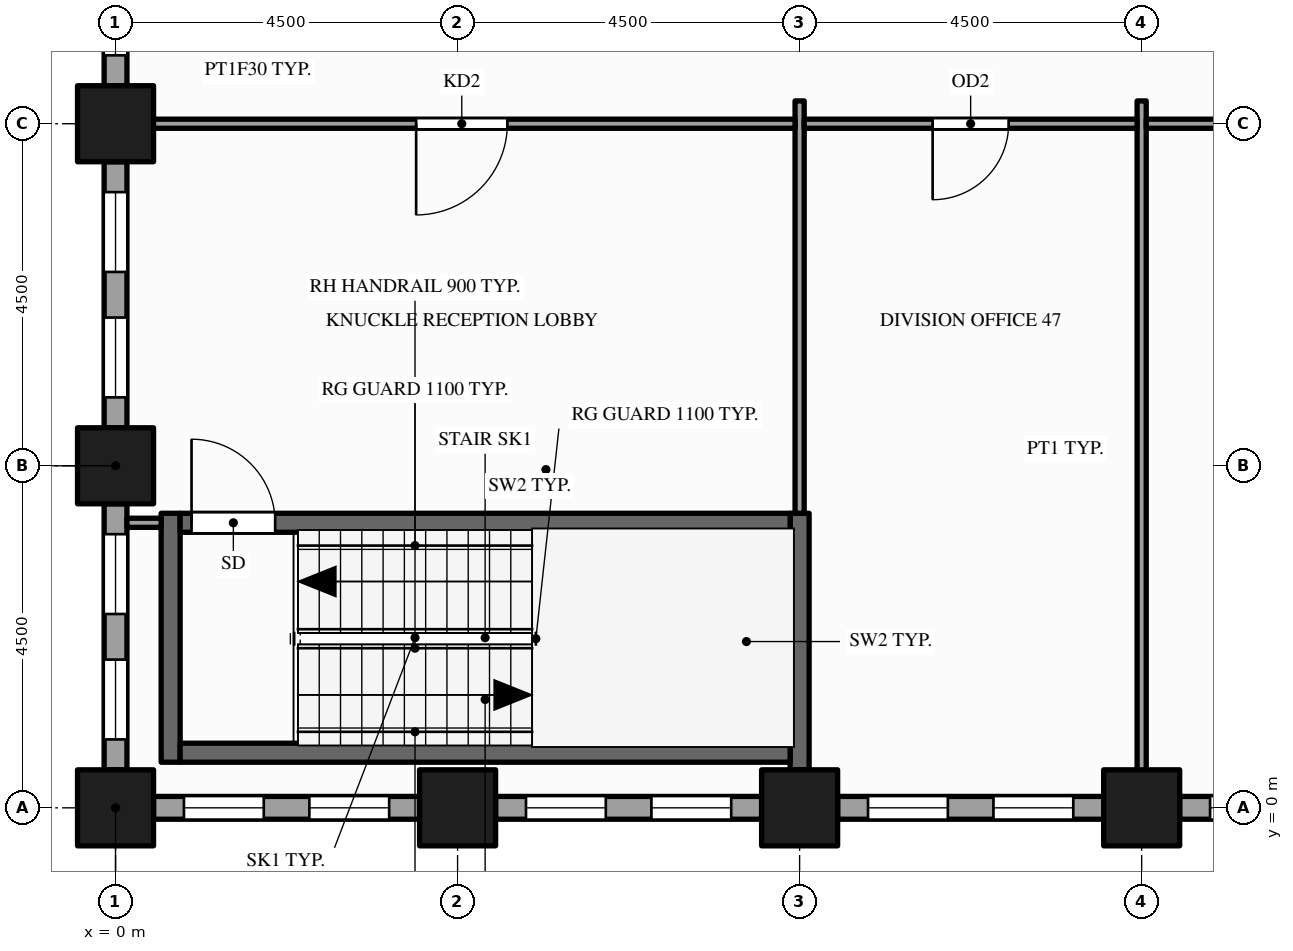
"""IFC4 building model, lengths in metres.
Left out: names, types, materials, properties, quantities, classifications, styles, units other than length and angle.
Written with IfcOpenShell. Run it as: python <this file> out.ifc"""

import sys

from ifc_helpers import new_model, si_unit, direction, frame, frame_2d, origin, origin_2d, place, context, subcontext, project, spatial, rectangle, hollow_rectangle, extrude, element, fill, save


model = new_model("IFC4")
c1 = context("Model", 3, precision=1e-05, world=origin(), true_north=direction((0.0, 1.0)))
c2 = subcontext(c1, "Body", "Model", "MODEL_VIEW")
j1 = project(units=[si_unit("LENGTHUNIT", "METRE"), si_unit("PLANEANGLEUNIT", "RADIAN")], contexts=[c1])
p1 = place(None, origin())
s1 = spatial("IfcSite", under=j1, at=p1, CompositionType="ELEMENT")
p2 = place(p1, origin())
s2 = spatial("IfcBuilding", under=s1, at=p2, CompositionType="ELEMENT")
p3 = place(p2, frame((0.0, 0.0, 115.0)))
s3 = spatial("IfcBuildingStorey", under=s2, at=p3, CompositionType="ELEMENT", Elevation=115.0)
for number, where, z_axis, x_axis in (
    (1, (0.0, 0.0, -0.15), (0.0, 0.0, 1.0), (1.0, 0.0, 0.0)),
    (2, (0.0, 4.5, -0.15), (0.0, 0.0, 1.0), (1.0, 0.0, 0.0)),
    (3, (0.0, 9.0, -0.15), (0.0, 0.0, 1.0), (1.0, 0.0, 0.0)),
    (4, (4.5, 0.0, -0.15), (0.0, 0.0, 1.0), (1.0, 0.0, 0.0)),
    (5, (9.0, 0.0, -0.15), (0.0, 0.0, 1.0), (1.0, 0.0, 0.0)),
    (6, (13.5, 0.0, -0.15), (0.0, 0.0, 1.0), (1.0, 0.0, 0.0)),
):
    element("IfcColumn", number, at=place(p3, frame(where, z_axis=z_axis, x_axis=x_axis)), inside=s3, PredefinedType="COLUMN", context=c2, shape_type="SweptSolid", body=[
        extrude(hollow_rectangle(XDim=1.0, YDim=1.0, WallThickness=0.05, at=origin_2d()), origin(), (0.0, 0.0, 1.0), 4.0),
    ])
p4 = place(p3, frame((0.0, 13.0, 0.0), z_axis=(0.0, 0.0, 1.0), x_axis=(0.0, -1.0, 0.0)))
e7 = element("IfcWall", 7, at=p4, inside=s3, PredefinedType="STANDARD", context=c2, shape_type="SweptSolid", body=[
    extrude(rectangle(XDim=3.5, YDim=0.3, at=frame_2d((1.75, 0.0))), origin(), (0.0, 0.0, 1.0), 3.154),
])
p5 = place(p4, frame((0.4, 0.0, 0.9)))
e8 = element("IfcOpeningElement", 8, at=p5, cuts=e7, PredefinedType="OPENING", context=c2, shape_type="SweptSolid", body=[
    extrude(rectangle(XDim=1.05, YDim=2.0, at=frame_2d((0.525, 1.0))), frame((0.0, 0.16, 0.0), z_axis=(0.0, -1.0, 0.0), x_axis=(1.0, 0.0, 0.0)), (0.0, 0.0, 1.0), 0.32),
])
p6 = place(p4, frame((2.05, 0.0, 0.9)))
e9 = element("IfcOpeningElement", 9, at=p6, cuts=e7, PredefinedType="OPENING", context=c2, shape_type="SweptSolid", body=[
    extrude(rectangle(XDim=1.05, YDim=2.0, at=frame_2d((0.525, 1.0))), frame((0.0, 0.16, 0.0), z_axis=(0.0, -1.0, 0.0), x_axis=(1.0, 0.0, 0.0)), (0.0, 0.0, 1.0), 0.32),
])
p7 = place(p3, frame((0.0, 8.5, 0.0), z_axis=(0.0, 0.0, 1.0), x_axis=(0.0, -1.0, 0.0)))
e10 = element("IfcWall", 10, at=p7, inside=s3, PredefinedType="STANDARD", context=c2, shape_type="SweptSolid", body=[
    extrude(rectangle(XDim=3.5, YDim=0.3, at=frame_2d((1.75, 0.0))), origin(), (0.0, 0.0, 1.0), 3.154),
])
p8 = place(p7, frame((0.4, 0.0, 0.9)))
e11 = element("IfcOpeningElement", 11, at=p8, cuts=e10, PredefinedType="OPENING", context=c2, shape_type="SweptSolid", body=[
    extrude(rectangle(XDim=1.05, YDim=2.0, at=frame_2d((0.525, 1.0))), frame((0.0, 0.16, 0.0), z_axis=(0.0, -1.0, 0.0), x_axis=(1.0, 0.0, 0.0)), (0.0, 0.0, 1.0), 0.32),
])
p9 = place(p7, frame((2.05, 0.0, 0.9)))
e12 = element("IfcOpeningElement", 12, at=p9, cuts=e10, PredefinedType="OPENING", context=c2, shape_type="SweptSolid", body=[
    extrude(rectangle(XDim=1.05, YDim=2.0, at=frame_2d((0.525, 1.0))), frame((0.0, 0.16, 0.0), z_axis=(0.0, -1.0, 0.0), x_axis=(1.0, 0.0, 0.0)), (0.0, 0.0, 1.0), 0.32),
])
p10 = place(p3, frame((0.0, 4.0, 0.0), z_axis=(0.0, 0.0, 1.0), x_axis=(0.0, -1.0, 0.0)))
e13 = element("IfcWall", 13, at=p10, inside=s3, PredefinedType="STANDARD", context=c2, shape_type="SweptSolid", body=[
    extrude(rectangle(XDim=3.5, YDim=0.3, at=frame_2d((1.75, 0.0))), origin(), (0.0, 0.0, 1.0), 3.154),
])
p11 = place(p10, frame((0.4, 0.0, 0.9)))
e14 = element("IfcOpeningElement", 14, at=p11, cuts=e13, PredefinedType="OPENING", context=c2, shape_type="SweptSolid", body=[
    extrude(rectangle(XDim=1.05, YDim=2.0, at=frame_2d((0.525, 1.0))), frame((0.0, 0.16, 0.0), z_axis=(0.0, -1.0, 0.0), x_axis=(1.0, 0.0, 0.0)), (0.0, 0.0, 1.0), 0.32),
])
p12 = place(p10, frame((2.05, 0.0, 0.9)))
e15 = element("IfcOpeningElement", 15, at=p12, cuts=e13, PredefinedType="OPENING", context=c2, shape_type="SweptSolid", body=[
    extrude(rectangle(XDim=1.05, YDim=2.0, at=frame_2d((0.525, 1.0))), frame((0.0, 0.16, 0.0), z_axis=(0.0, -1.0, 0.0), x_axis=(1.0, 0.0, 0.0)), (0.0, 0.0, 1.0), 0.32),
])
p13 = place(p3, frame((0.5, 0.0, 0.0), z_axis=(0.0, 0.0, 1.0), x_axis=(1.0, 0.0, 0.0)))
e16 = element("IfcWall", 16, at=p13, inside=s3, PredefinedType="STANDARD", context=c2, shape_type="SweptSolid", body=[
    extrude(rectangle(XDim=3.5, YDim=0.3, at=frame_2d((1.75, 0.0))), origin(), (0.0, 0.0, 1.0), 3.154),
])
p14 = place(p13, frame((0.4, 0.0, 0.9)))
e17 = element("IfcOpeningElement", 17, at=p14, cuts=e16, PredefinedType="OPENING", context=c2, shape_type="SweptSolid", body=[
    extrude(rectangle(XDim=1.05, YDim=2.0, at=frame_2d((0.525, 1.0))), frame((0.0, 0.16, 0.0), z_axis=(0.0, -1.0, 0.0), x_axis=(1.0, 0.0, 0.0)), (0.0, 0.0, 1.0), 0.32),
])
p15 = place(p13, frame((2.05, 0.0, 0.9)))
e18 = element("IfcOpeningElement", 18, at=p15, cuts=e16, PredefinedType="OPENING", context=c2, shape_type="SweptSolid", body=[
    extrude(rectangle(XDim=1.05, YDim=2.0, at=frame_2d((0.525, 1.0))), frame((0.0, 0.16, 0.0), z_axis=(0.0, -1.0, 0.0), x_axis=(1.0, 0.0, 0.0)), (0.0, 0.0, 1.0), 0.32),
])
p16 = place(p3, frame((5.0, 0.0, 0.0), z_axis=(0.0, 0.0, 1.0), x_axis=(1.0, 0.0, 0.0)))
e19 = element("IfcWall", 19, at=p16, inside=s3, PredefinedType="STANDARD", context=c2, shape_type="SweptSolid", body=[
    extrude(rectangle(XDim=3.5, YDim=0.3, at=frame_2d((1.75, 0.0))), origin(), (0.0, 0.0, 1.0), 3.154),
])
p17 = place(p16, frame((0.4, 0.0, 0.9)))
e20 = element("IfcOpeningElement", 20, at=p17, cuts=e19, PredefinedType="OPENING", context=c2, shape_type="SweptSolid", body=[
    extrude(rectangle(XDim=1.05, YDim=2.0, at=frame_2d((0.525, 1.0))), frame((0.0, 0.16, 0.0), z_axis=(0.0, -1.0, 0.0), x_axis=(1.0, 0.0, 0.0)), (0.0, 0.0, 1.0), 0.32),
])
p18 = place(p16, frame((2.05, 0.0, 0.9)))
e21 = element("IfcOpeningElement", 21, at=p18, cuts=e19, PredefinedType="OPENING", context=c2, shape_type="SweptSolid", body=[
    extrude(rectangle(XDim=1.05, YDim=2.0, at=frame_2d((0.525, 1.0))), frame((0.0, 0.16, 0.0), z_axis=(0.0, -1.0, 0.0), x_axis=(1.0, 0.0, 0.0)), (0.0, 0.0, 1.0), 0.32),
])
p19 = place(p3, frame((9.5, 0.0, 0.0), z_axis=(0.0, 0.0, 1.0), x_axis=(1.0, 0.0, 0.0)))
e22 = element("IfcWall", 22, at=p19, inside=s3, PredefinedType="STANDARD", context=c2, shape_type="SweptSolid", body=[
    extrude(rectangle(XDim=3.5, YDim=0.3, at=frame_2d((1.75, 0.0))), origin(), (0.0, 0.0, 1.0), 3.154),
])
p20 = place(p19, frame((0.4, 0.0, 0.9)))
e23 = element("IfcOpeningElement", 23, at=p20, cuts=e22, PredefinedType="OPENING", context=c2, shape_type="SweptSolid", body=[
    extrude(rectangle(XDim=1.05, YDim=2.0, at=frame_2d((0.525, 1.0))), frame((0.0, 0.16, 0.0), z_axis=(0.0, -1.0, 0.0), x_axis=(1.0, 0.0, 0.0)), (0.0, 0.0, 1.0), 0.32),
])
p21 = place(p19, frame((2.05, 0.0, 0.9)))
e24 = element("IfcOpeningElement", 24, at=p21, cuts=e22, PredefinedType="OPENING", context=c2, shape_type="SweptSolid", body=[
    extrude(rectangle(XDim=1.05, YDim=2.0, at=frame_2d((0.525, 1.0))), frame((0.0, 0.16, 0.0), z_axis=(0.0, -1.0, 0.0), x_axis=(1.0, 0.0, 0.0)), (0.0, 0.0, 1.0), 0.32),
])
p22 = place(p3, frame((14.0, 0.0, 0.0), z_axis=(0.0, 0.0, 1.0), x_axis=(1.0, 0.0, 0.0)))
e25 = element("IfcWall", 25, at=p22, inside=s3, PredefinedType="STANDARD", context=c2, shape_type="SweptSolid", body=[
    extrude(rectangle(XDim=3.5, YDim=0.3, at=frame_2d((1.75, 0.0))), origin(), (0.0, 0.0, 1.0), 3.154),
])
p23 = place(p22, frame((0.4, 0.0, 0.9)))
e26 = element("IfcOpeningElement", 26, at=p23, cuts=e25, PredefinedType="OPENING", context=c2, shape_type="SweptSolid", body=[
    extrude(rectangle(XDim=1.05, YDim=2.0, at=frame_2d((0.525, 1.0))), frame((0.0, 0.16, 0.0), z_axis=(0.0, -1.0, 0.0), x_axis=(1.0, 0.0, 0.0)), (0.0, 0.0, 1.0), 0.32),
])
p24 = place(p22, frame((2.05, 0.0, 0.9)))
e27 = element("IfcOpeningElement", 27, at=p24, cuts=e25, PredefinedType="OPENING", context=c2, shape_type="SweptSolid", body=[
    extrude(rectangle(XDim=1.05, YDim=2.0, at=frame_2d((0.525, 1.0))), frame((0.0, 0.16, 0.0), z_axis=(0.0, -1.0, 0.0), x_axis=(1.0, 0.0, 0.0)), (0.0, 0.0, 1.0), 0.32),
])
p25 = place(p3, frame((0.725, 0.6, 0.0), z_axis=(0.0, 0.0, 1.0), x_axis=(0.0, 1.0, 0.0)))
e28 = element("IfcWall", 28, at=p25, inside=s3, PredefinedType="SHEAR", context=c2, shape_type="SweptSolid", body=[
    extrude(rectangle(XDim=3.275, YDim=0.25, at=frame_2d((1.637, 0.0))), origin(), (0.0, 0.0, 1.0), 3.85),
])
p26 = place(p3, frame((9.0, 0.15, 0.0), z_axis=(0.0, 0.0, 1.0), x_axis=(0.0, 1.0, 0.0)))
e29 = element("IfcWall", 29, at=p26, inside=s3, PredefinedType="PARTITIONING", context=c2, shape_type="SweptSolid", body=[
    extrude(rectangle(XDim=0.35, YDim=0.12, at=frame_2d((0.175, 0.0))), origin(), (0.0, 0.0, 1.0), 3.85),
])
p27 = place(p3, frame((9.0, 0.5, 0.0), z_axis=(0.0, 0.0, 1.0), x_axis=(0.0, 1.0, 0.0)))
e30 = element("IfcWall", 30, at=p27, inside=s3, PredefinedType="SHEAR", context=c2, shape_type="SweptSolid", body=[
    extrude(rectangle(XDim=3.375, YDim=0.25, at=frame_2d((1.688, 0.0))), origin(), (0.0, 0.0, 1.0), 3.85),
])
p28 = place(p3, frame((9.0, 3.875, 0.0), z_axis=(0.0, 0.0, 1.0), x_axis=(0.0, 1.0, 0.0)))
e31 = element("IfcWall", 31, at=p28, inside=s3, PredefinedType="PARTITIONING", context=c2, shape_type="SweptSolid", body=[
    extrude(rectangle(XDim=5.425, YDim=0.12, at=frame_2d((2.712, 0.0))), origin(), (0.0, 0.0, 1.0), 2.938),
])
p29 = place(p3, frame((13.5, 0.15, 0.0), z_axis=(0.0, 0.0, 1.0), x_axis=(0.0, 1.0, 0.0)))
e32 = element("IfcWall", 32, at=p29, inside=s3, PredefinedType="PARTITIONING", context=c2, shape_type="SweptSolid", body=[
    extrude(rectangle(XDim=9.15, YDim=0.12, at=frame_2d((4.575, 0.0))), origin(), (0.0, 0.0, 1.0), 2.938),
])
p30 = place(p3, frame((0.85, 0.725, 0.0), z_axis=(0.0, 0.0, 1.0), x_axis=(1.0, 0.0, 0.0)))
e33 = element("IfcWall", 33, at=p30, inside=s3, PredefinedType="SHEAR", context=c2, shape_type="SweptSolid", body=[
    extrude(rectangle(XDim=8.025, YDim=0.25, at=frame_2d((4.012, 0.0))), origin(), (0.0, 0.0, 1.0), 3.85),
])
p31 = place(p3, frame((0.15, 3.75, 0.0), z_axis=(0.0, 0.0, 1.0), x_axis=(1.0, 0.0, 0.0)))
e34 = element("IfcWall", 34, at=p31, inside=s3, PredefinedType="PARTITIONING", context=c2, shape_type="SweptSolid", body=[
    extrude(rectangle(XDim=0.45, YDim=0.12, at=frame_2d((0.225, 0.0))), origin(), (0.0, 0.0, 1.0), 3.154),
])
p32 = place(p3, frame((0.85, 3.75, 0.0), z_axis=(0.0, 0.0, 1.0), x_axis=(1.0, 0.0, 0.0)))
e35 = element("IfcWall", 35, at=p32, inside=s3, PredefinedType="SHEAR", context=c2, shape_type="SweptSolid", body=[
    extrude(rectangle(XDim=8.025, YDim=0.25, at=frame_2d((4.012, 0.0))), origin(), (0.0, 0.0, 1.0), 3.85),
])
p33 = place(p32, frame((0.15, 0.0, 0.0)))
e36 = element("IfcOpeningElement", 36, at=p33, cuts=e35, PredefinedType="OPENING", context=c2, shape_type="SweptSolid", body=[
    extrude(rectangle(XDim=1.1, YDim=2.1, at=frame_2d((0.55, 1.05))), frame((0.0, 0.135, 0.0), z_axis=(0.0, -1.0, 0.0), x_axis=(1.0, 0.0, 0.0)), (0.0, 0.0, 1.0), 0.27),
])
p34 = place(p3, frame((0.15, 9.0, 0.0), z_axis=(0.0, 0.0, 1.0), x_axis=(1.0, 0.0, 0.0)))
e37 = element("IfcWall", 37, at=p34, inside=s3, PredefinedType="PARTITIONING", context=c2, shape_type="SweptSolid", body=[
    extrude(rectangle(XDim=8.79, YDim=0.12, at=frame_2d((4.395, 0.0))), origin(), (0.0, 0.0, 1.0), 2.938),
])
p35 = place(p34, frame((3.805, 0.0, 0.0)))
e38 = element("IfcOpeningElement", 38, at=p35, cuts=e37, PredefinedType="OPENING", context=c2, shape_type="SweptSolid", body=[
    extrude(rectangle(XDim=1.2, YDim=2.1, at=frame_2d((0.6, 1.05))), frame((0.0, 0.07, 0.0), z_axis=(0.0, -1.0, 0.0), x_axis=(1.0, 0.0, 0.0)), (0.0, 0.0, 1.0), 0.14),
])
p36 = place(p3, frame((9.06, 9.0, 0.0), z_axis=(0.0, 0.0, 1.0), x_axis=(1.0, 0.0, 0.0)))
e39 = element("IfcWall", 39, at=p36, inside=s3, PredefinedType="PARTITIONING", context=c2, shape_type="SweptSolid", body=[
    extrude(rectangle(XDim=4.38, YDim=0.12, at=frame_2d((2.19, 0.0))), origin(), (0.0, 0.0, 1.0), 2.938),
])
p37 = place(p36, frame((1.69, 0.0, 0.0)))
e40 = element("IfcOpeningElement", 40, at=p37, cuts=e39, PredefinedType="OPENING", context=c2, shape_type="SweptSolid", body=[
    extrude(rectangle(XDim=1.0, YDim=2.1, at=frame_2d((0.5, 1.05))), frame((0.0, 0.07, 0.0), z_axis=(0.0, -1.0, 0.0), x_axis=(1.0, 0.0, 0.0)), (0.0, 0.0, 1.0), 0.14),
])
p38 = place(p3, frame((13.56, 9.0, 0.0), z_axis=(0.0, 0.0, 1.0), x_axis=(1.0, 0.0, 0.0)))
e41 = element("IfcWall", 41, at=p38, inside=s3, PredefinedType="PARTITIONING", context=c2, shape_type="SweptSolid", body=[
    extrude(rectangle(XDim=4.38, YDim=0.12, at=frame_2d((2.19, 0.0))), origin(), (0.0, 0.0, 1.0), 2.938),
])
p39 = place(p38, frame((1.69, 0.0, 0.0)))
e42 = element("IfcOpeningElement", 42, at=p39, cuts=e41, PredefinedType="OPENING", context=c2, shape_type="SweptSolid", body=[
    extrude(rectangle(XDim=1.0, YDim=2.1, at=frame_2d((0.5, 1.05))), frame((0.0, 0.07, 0.0), z_axis=(0.0, -1.0, 0.0), x_axis=(1.0, 0.0, 0.0)), (0.0, 0.0, 1.0), 0.14),
])
p40 = place(p6, origin())
e43 = element("IfcWindow", 43, at=p40, inside=s3, PartitioningType="SINGLE_PANEL", PredefinedType="WINDOW", context=c2, shape_type="SweptSolid", body=[
    extrude(rectangle(XDim=1.05, YDim=2.0, at=frame_2d((0.525, 1.0))), frame((0.0, 0.03, 0.0), z_axis=(0.0, -1.0, 0.0), x_axis=(1.0, 0.0, 0.0)), (0.0, 0.0, 1.0), 0.06),
])
fill(e9, e43)
p41 = place(p8, origin())
e44 = element("IfcWindow", 44, at=p41, inside=s3, PartitioningType="SINGLE_PANEL", PredefinedType="WINDOW", context=c2, shape_type="SweptSolid", body=[
    extrude(rectangle(XDim=1.05, YDim=2.0, at=frame_2d((0.525, 1.0))), frame((0.0, 0.03, 0.0), z_axis=(0.0, -1.0, 0.0), x_axis=(1.0, 0.0, 0.0)), (0.0, 0.0, 1.0), 0.06),
])
fill(e11, e44)
p42 = place(p9, origin())
e45 = element("IfcWindow", 45, at=p42, inside=s3, PartitioningType="SINGLE_PANEL", PredefinedType="WINDOW", context=c2, shape_type="SweptSolid", body=[
    extrude(rectangle(XDim=1.05, YDim=2.0, at=frame_2d((0.525, 1.0))), frame((0.0, 0.03, 0.0), z_axis=(0.0, -1.0, 0.0), x_axis=(1.0, 0.0, 0.0)), (0.0, 0.0, 1.0), 0.06),
])
fill(e12, e45)
p43 = place(p11, origin())
e46 = element("IfcWindow", 46, at=p43, inside=s3, PartitioningType="SINGLE_PANEL", PredefinedType="WINDOW", context=c2, shape_type="SweptSolid", body=[
    extrude(rectangle(XDim=1.05, YDim=2.0, at=frame_2d((0.525, 1.0))), frame((0.0, 0.03, 0.0), z_axis=(0.0, -1.0, 0.0), x_axis=(1.0, 0.0, 0.0)), (0.0, 0.0, 1.0), 0.06),
])
fill(e14, e46)
p44 = place(p12, origin())
e47 = element("IfcWindow", 47, at=p44, inside=s3, PartitioningType="SINGLE_PANEL", PredefinedType="WINDOW", context=c2, shape_type="SweptSolid", body=[
    extrude(rectangle(XDim=1.05, YDim=2.0, at=frame_2d((0.525, 1.0))), frame((0.0, 0.03, 0.0), z_axis=(0.0, -1.0, 0.0), x_axis=(1.0, 0.0, 0.0)), (0.0, 0.0, 1.0), 0.06),
])
fill(e15, e47)
p45 = place(p14, origin())
e48 = element("IfcWindow", 48, at=p45, inside=s3, PartitioningType="SINGLE_PANEL", PredefinedType="WINDOW", context=c2, shape_type="SweptSolid", body=[
    extrude(rectangle(XDim=1.05, YDim=2.0, at=frame_2d((0.525, 1.0))), frame((0.0, 0.03, 0.0), z_axis=(0.0, -1.0, 0.0), x_axis=(1.0, 0.0, 0.0)), (0.0, 0.0, 1.0), 0.06),
])
fill(e17, e48)
p46 = place(p15, origin())
e49 = element("IfcWindow", 49, at=p46, inside=s3, PartitioningType="SINGLE_PANEL", PredefinedType="WINDOW", context=c2, shape_type="SweptSolid", body=[
    extrude(rectangle(XDim=1.05, YDim=2.0, at=frame_2d((0.525, 1.0))), frame((0.0, 0.03, 0.0), z_axis=(0.0, -1.0, 0.0), x_axis=(1.0, 0.0, 0.0)), (0.0, 0.0, 1.0), 0.06),
])
fill(e18, e49)
p47 = place(p17, origin())
e50 = element("IfcWindow", 50, at=p47, inside=s3, PartitioningType="SINGLE_PANEL", PredefinedType="WINDOW", context=c2, shape_type="SweptSolid", body=[
    extrude(rectangle(XDim=1.05, YDim=2.0, at=frame_2d((0.525, 1.0))), frame((0.0, 0.03, 0.0), z_axis=(0.0, -1.0, 0.0), x_axis=(1.0, 0.0, 0.0)), (0.0, 0.0, 1.0), 0.06),
])
fill(e20, e50)
p48 = place(p18, origin())
e51 = element("IfcWindow", 51, at=p48, inside=s3, PartitioningType="SINGLE_PANEL", PredefinedType="WINDOW", context=c2, shape_type="SweptSolid", body=[
    extrude(rectangle(XDim=1.05, YDim=2.0, at=frame_2d((0.525, 1.0))), frame((0.0, 0.03, 0.0), z_axis=(0.0, -1.0, 0.0), x_axis=(1.0, 0.0, 0.0)), (0.0, 0.0, 1.0), 0.06),
])
fill(e21, e51)
p49 = place(p20, origin())
e52 = element("IfcWindow", 52, at=p49, inside=s3, PartitioningType="SINGLE_PANEL", PredefinedType="WINDOW", context=c2, shape_type="SweptSolid", body=[
    extrude(rectangle(XDim=1.05, YDim=2.0, at=frame_2d((0.525, 1.0))), frame((0.0, 0.03, 0.0), z_axis=(0.0, -1.0, 0.0), x_axis=(1.0, 0.0, 0.0)), (0.0, 0.0, 1.0), 0.06),
])
fill(e23, e52)
p50 = place(p21, origin())
e53 = element("IfcWindow", 53, at=p50, inside=s3, PartitioningType="SINGLE_PANEL", PredefinedType="WINDOW", context=c2, shape_type="SweptSolid", body=[
    extrude(rectangle(XDim=1.05, YDim=2.0, at=frame_2d((0.525, 1.0))), frame((0.0, 0.03, 0.0), z_axis=(0.0, -1.0, 0.0), x_axis=(1.0, 0.0, 0.0)), (0.0, 0.0, 1.0), 0.06),
])
fill(e24, e53)
p51 = place(p23, origin())
e54 = element("IfcWindow", 54, at=p51, inside=s3, PartitioningType="SINGLE_PANEL", PredefinedType="WINDOW", context=c2, shape_type="SweptSolid", body=[
    extrude(rectangle(XDim=1.05, YDim=2.0, at=frame_2d((0.525, 1.0))), frame((0.0, 0.03, 0.0), z_axis=(0.0, -1.0, 0.0), x_axis=(1.0, 0.0, 0.0)), (0.0, 0.0, 1.0), 0.06),
])
fill(e26, e54)
p52 = place(p33, origin())
e55 = element("IfcDoor", 55, at=p52, inside=s3, OperationType="SINGLE_SWING_LEFT", PredefinedType="DOOR", context=c2, shape_type="SweptSolid", body=[
    extrude(rectangle(XDim=1.1, YDim=2.1, at=frame_2d((0.55, 1.05))), frame((0.0, 0.025, 0.0), z_axis=(0.0, -1.0, 0.0), x_axis=(1.0, 0.0, 0.0)), (0.0, 0.0, 1.0), 0.05),
])
fill(e36, e55)
p53 = place(p35, origin())
e56 = element("IfcDoor", 56, at=p53, inside=s3, OperationType="SINGLE_SWING_LEFT", PredefinedType="DOOR", context=c2, shape_type="SweptSolid", body=[
    extrude(rectangle(XDim=1.2, YDim=2.1, at=frame_2d((0.6, 1.05))), frame((0.0, 0.025, 0.0), z_axis=(0.0, -1.0, 0.0), x_axis=(1.0, 0.0, 0.0)), (0.0, 0.0, 1.0), 0.05),
])
fill(e38, e56)
p54 = place(p37, origin())
e57 = element("IfcDoor", 57, at=p54, inside=s3, OperationType="SINGLE_SWING_LEFT", PredefinedType="DOOR", context=c2, shape_type="SweptSolid", body=[
    extrude(rectangle(XDim=1.0, YDim=2.1, at=frame_2d((0.5, 1.05))), frame((0.0, 0.025, 0.0), z_axis=(0.0, -1.0, 0.0), x_axis=(1.0, 0.0, 0.0)), (0.0, 0.0, 1.0), 0.05),
])
fill(e40, e57)
save(model, sys.argv[1])
